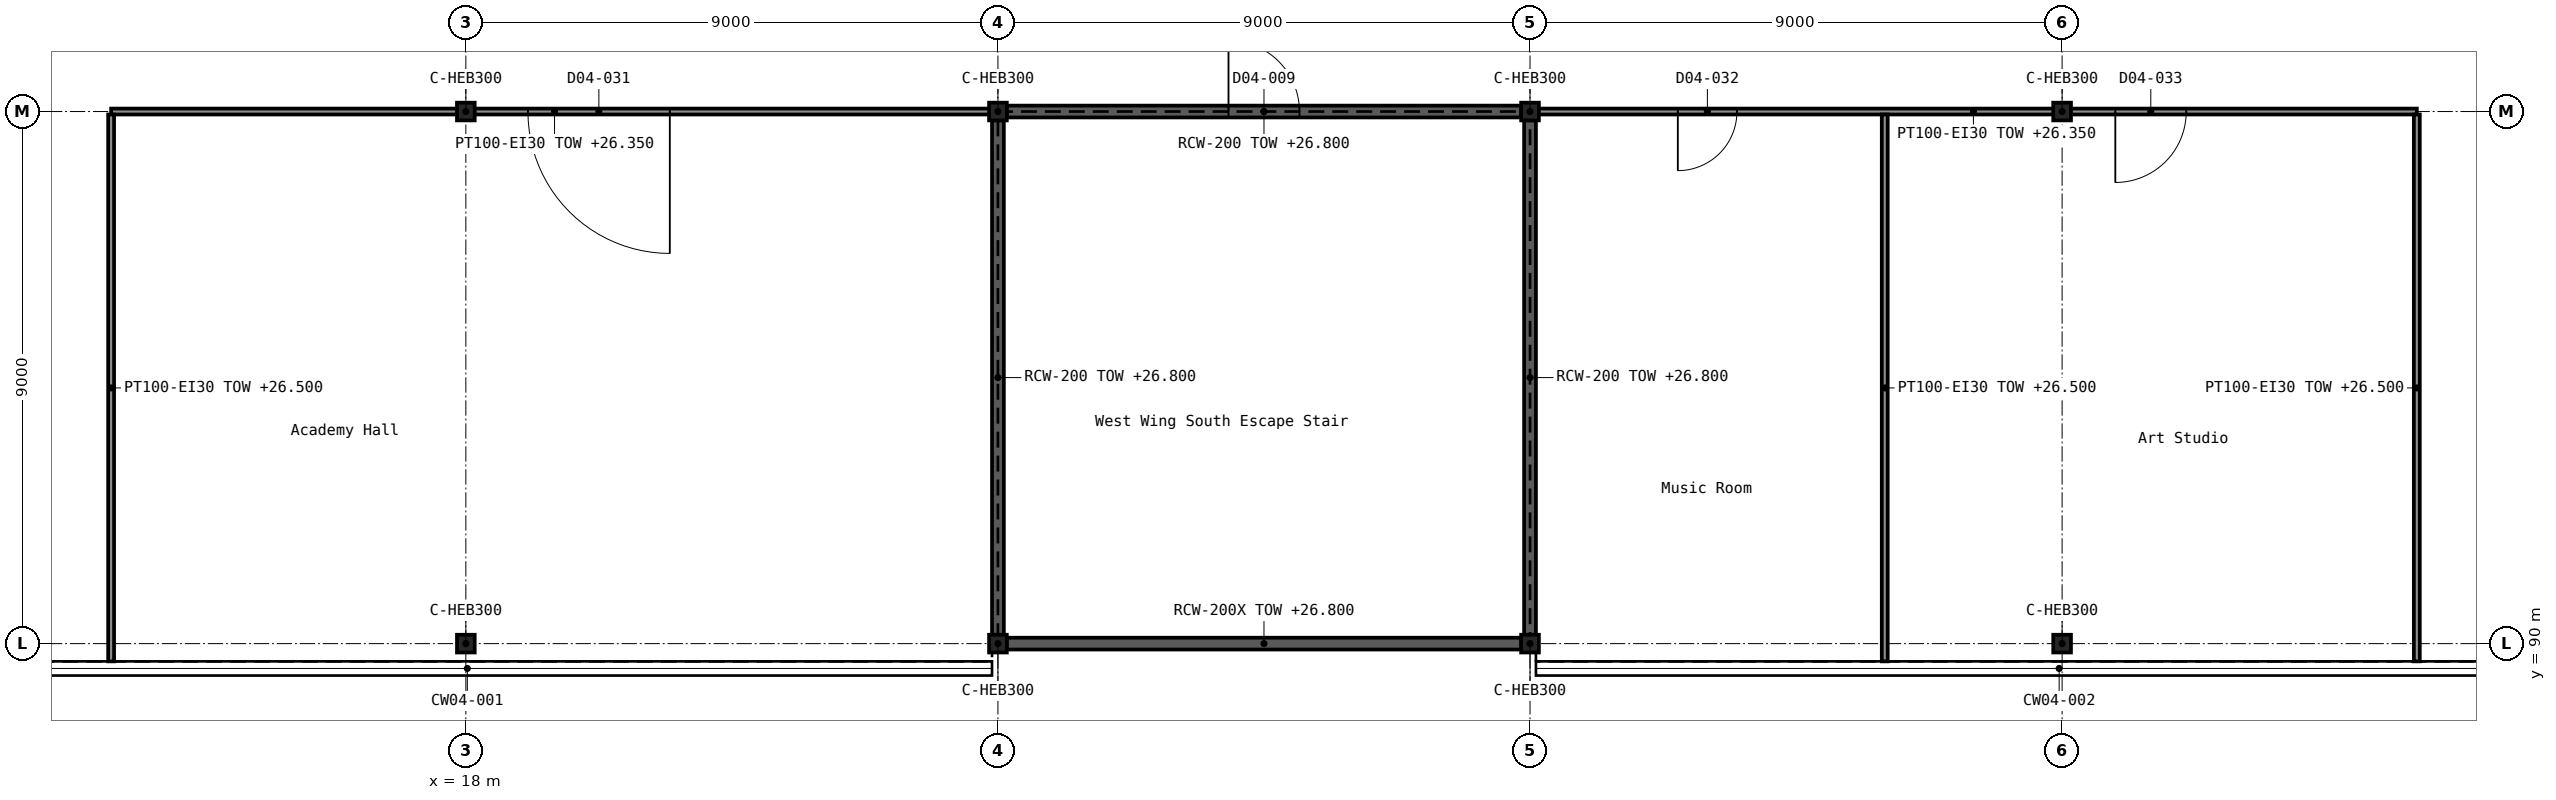
"""IFC4 building model, lengths in metres.
Left out: names, types, materials, properties, quantities, classifications, styles, units other than length and angle.
Written with IfcOpenShell. Run it as: python <this file> out.ifc"""

import sys

from ifc_helpers import new_model, si_unit, direction, frame, frame_2d, origin, origin_2d, place, context, subcontext, project, spatial, rectangle, i_section, extrude, element, fill, save


model = new_model("IFC4")
c1 = context("Model", 3, precision=1e-05, world=origin(), true_north=direction((0.0, 1.0)))
c2 = subcontext(c1, "Body", "Model", "MODEL_VIEW")
j1 = project(units=[si_unit("LENGTHUNIT", "METRE"), si_unit("PLANEANGLEUNIT", "RADIAN")], contexts=[c1])
p1 = place(None, origin())
s1 = spatial("IfcSite", under=j1, at=p1, CompositionType="ELEMENT")
p2 = place(p1, origin())
s2 = spatial("IfcBuilding", under=s1, at=p2, CompositionType="ELEMENT")
p3 = place(p2, frame((0.0, 0.0, 21.6)))
s3 = spatial("IfcBuildingStorey", under=s2, at=p3, CompositionType="ELEMENT", Elevation=21.6)
for number, where, z_axis, x_axis in (
    (1, (18.0, 90.0, 0.0), (0.0, 0.0, 1.0), (1.0, 0.0, 0.0)),
    (2, (27.0, 90.0, 0.0), (0.0, 0.0, 1.0), (1.0, 0.0, 0.0)),
    (3, (36.0, 90.0, 0.0), (0.0, 0.0, 1.0), (1.0, 0.0, 0.0)),
    (4, (45.0, 90.0, 0.0), (0.0, 0.0, 1.0), (1.0, 0.0, 0.0)),
    (5, (18.0, 99.0, 0.0), (0.0, 0.0, 1.0), (1.0, 0.0, 0.0)),
    (6, (27.0, 99.0, 0.0), (0.0, 0.0, 1.0), (1.0, 0.0, 0.0)),
    (7, (36.0, 99.0, 0.0), (0.0, 0.0, 1.0), (1.0, 0.0, 0.0)),
    (8, (45.0, 99.0, 0.0), (0.0, 0.0, 1.0), (1.0, 0.0, 0.0)),
):
    element("IfcColumn", number, at=place(p3, frame(where, z_axis=z_axis, x_axis=x_axis)), inside=s3, PredefinedType="COLUMN", context=c2, shape_type="SweptSolid", body=[
        extrude(i_section(OverallWidth=0.3, OverallDepth=0.3, WebThickness=0.011, FlangeThickness=0.019, FilletRadius=0.027, at=origin_2d()), origin(), (0.0, 0.0, 1.0), 5.4),
    ])
p4 = place(p3, frame((27.15, 90.0, 0.0), z_axis=(0.0, 0.0, 1.0), x_axis=(1.0, 0.0, 0.0)))
e9 = element("IfcWall", 9, at=p4, inside=s3, PredefinedType="SHEAR", context=c2, shape_type="SweptSolid", body=[
    extrude(rectangle(XDim=8.7, YDim=0.2, at=frame_2d((4.35, 0.0))), origin(), (0.0, 0.0, 1.0), 5.2),
])
p5 = place(p3, frame((27.15, 99.0, 0.0), z_axis=(0.0, 0.0, 1.0), x_axis=(1.0, 0.0, 0.0)))
e10 = element("IfcWall", 10, at=p5, inside=s3, PredefinedType="SHEAR", context=c2, shape_type="SweptSolid", body=[
    extrude(rectangle(XDim=8.7, YDim=0.2, at=frame_2d((4.35, 0.0))), origin(), (0.0, 0.0, 1.0), 5.2),
])
p6 = place(p5, frame((3.75, 0.0, 0.0)))
e11 = element("IfcOpeningElement", 11, at=p6, cuts=e10, PredefinedType="OPENING", context=c2, shape_type="SweptSolid", body=[
    extrude(rectangle(XDim=1.2, YDim=2.1, at=frame_2d((0.6, 1.05))), frame((0.0, 0.111, 0.0), z_axis=(0.0, -1.0, 0.0), x_axis=(1.0, 0.0, 0.0)), (0.0, 0.0, 1.0), 0.222),
])
for number, where, z_axis, x_axis in (
    (12, (27.0, 90.15, 0.0), (0.0, 0.0, 1.0), (0.0, 1.0, 0.0)),
    (13, (36.0, 90.15, 0.0), (0.0, 0.0, 1.0), (0.0, 1.0, 0.0)),
):
    element("IfcWall", number, at=place(p3, frame(where, z_axis=z_axis, x_axis=x_axis)), inside=s3, PredefinedType="SHEAR", context=c2, shape_type="SweptSolid", body=[
        extrude(rectangle(XDim=8.7, YDim=0.2, at=frame_2d((4.35, 0.0))), origin(), (0.0, 0.0, 1.0), 5.2),
    ])
p7 = place(p3, frame((12.0, 99.0, 0.0), z_axis=(0.0, 0.0, 1.0), x_axis=(1.0, 0.0, 0.0)))
e14 = element("IfcWall", 14, at=p7, inside=s3, PredefinedType="PARTITIONING", context=c2, shape_type="SweptSolid", body=[
    extrude(rectangle(XDim=15.0, YDim=0.1, at=frame_2d((7.5, 0.0))), origin(), (0.0, 0.0, 1.0), 4.75),
])
p8 = place(p7, frame((7.05, 0.0, 0.0)))
e15 = element("IfcOpeningElement", 15, at=p8, cuts=e14, PredefinedType="OPENING", context=c2, shape_type="SweptSolid", body=[
    extrude(rectangle(XDim=2.4, YDim=2.1, at=frame_2d((1.2, 1.05))), frame((0.0, 0.061, 0.0), z_axis=(0.0, -1.0, 0.0), x_axis=(1.0, 0.0, 0.0)), (0.0, 0.0, 1.0), 0.122),
])
p9 = place(p3, frame((36.0, 99.0, 0.0), z_axis=(0.0, 0.0, 1.0), x_axis=(1.0, 0.0, 0.0)))
e16 = element("IfcWall", 16, at=p9, inside=s3, PredefinedType="PARTITIONING", context=c2, shape_type="SweptSolid", body=[
    extrude(rectangle(XDim=15.0, YDim=0.1, at=frame_2d((7.5, 0.0))), origin(), (0.0, 0.0, 1.0), 4.75),
])
p10 = place(p9, frame((2.5, 0.0, 0.0)))
e17 = element("IfcOpeningElement", 17, at=p10, cuts=e16, PredefinedType="OPENING", context=c2, shape_type="SweptSolid", body=[
    extrude(rectangle(XDim=1.0, YDim=2.1, at=frame_2d((0.5, 1.05))), frame((0.0, 0.061, 0.0), z_axis=(0.0, -1.0, 0.0), x_axis=(1.0, 0.0, 0.0)), (0.0, 0.0, 1.0), 0.122),
])
p11 = place(p9, frame((9.9, 0.0, 0.0)))
e18 = element("IfcOpeningElement", 18, at=p11, cuts=e16, PredefinedType="OPENING", context=c2, shape_type="SweptSolid", body=[
    extrude(rectangle(XDim=1.2, YDim=2.1, at=frame_2d((0.6, 1.05))), frame((0.0, 0.061, 0.0), z_axis=(0.0, -1.0, 0.0), x_axis=(1.0, 0.0, 0.0)), (0.0, 0.0, 1.0), 0.122),
])
for number, where, z_axis, x_axis in (
    (19, (12.0, 89.7, 0.0), (0.0, 0.0, 1.0), (0.0, 1.0, 0.0)),
    (20, (42.0, 89.7, 0.0), (0.0, 0.0, 1.0), (0.0, 1.0, 0.0)),
    (21, (51.0, 89.7, 0.0), (0.0, 0.0, 1.0), (0.0, 1.0, 0.0)),
):
    element("IfcWall", number, at=place(p3, frame(where, z_axis=z_axis, x_axis=x_axis)), inside=s3, PredefinedType="PARTITIONING", context=c2, shape_type="SweptSolid", body=[
        extrude(rectangle(XDim=9.25, YDim=0.1, at=frame_2d((4.625, 0.0))), origin(), (0.0, 0.0, 1.0), 4.9),
    ])
p12 = place(p6, origin())
e22 = element("IfcDoor", 22, at=p12, inside=s3, OperationType="SINGLE_SWING_LEFT", PredefinedType="DOOR", context=c2, shape_type="SweptSolid", body=[
    extrude(rectangle(XDim=1.2, YDim=2.1, at=frame_2d((0.6, 1.05))), frame((0.0, 0.025, 0.0), z_axis=(0.0, -1.0, 0.0), x_axis=(1.0, 0.0, 0.0)), (0.0, 0.0, 1.0), 0.05),
])
fill(e11, e22)
p13 = place(p8, frame((2.4, 0.0, 0.0), z_axis=(0.0, 0.0, 1.0), x_axis=(-1.0, 0.0, 0.0)))
e23 = element("IfcDoor", 23, at=p13, inside=s3, OperationType="DOUBLE_DOOR_SINGLE_SWING", PredefinedType="DOOR", context=c2, shape_type="SweptSolid", body=[
    extrude(rectangle(XDim=2.4, YDim=2.1, at=frame_2d((1.2, 1.05))), frame((0.0, 0.025, 0.0), z_axis=(0.0, -1.0, 0.0), x_axis=(1.0, 0.0, 0.0)), (0.0, 0.0, 1.0), 0.05),
])
fill(e15, e23)
p14 = place(p10, frame((1.0, 0.0, 0.0), z_axis=(0.0, 0.0, 1.0), x_axis=(-1.0, 0.0, 0.0)))
e24 = element("IfcDoor", 24, at=p14, inside=s3, OperationType="SINGLE_SWING_RIGHT", PredefinedType="DOOR", context=c2, shape_type="SweptSolid", body=[
    extrude(rectangle(XDim=1.0, YDim=2.1, at=frame_2d((0.5, 1.05))), frame((0.0, 0.025, 0.0), z_axis=(0.0, -1.0, 0.0), x_axis=(1.0, 0.0, 0.0)), (0.0, 0.0, 1.0), 0.05),
])
fill(e17, e24)
p15 = place(p11, frame((1.2, 0.0, 0.0), z_axis=(0.0, 0.0, 1.0), x_axis=(-1.0, 0.0, 0.0)))
e25 = element("IfcDoor", 25, at=p15, inside=s3, OperationType="SINGLE_SWING_RIGHT", PredefinedType="DOOR", context=c2, shape_type="SweptSolid", body=[
    extrude(rectangle(XDim=1.2, YDim=2.1, at=frame_2d((0.6, 1.05))), frame((0.0, 0.025, 0.0), z_axis=(0.0, -1.0, 0.0), x_axis=(1.0, 0.0, 0.0)), (0.0, 0.0, 1.0), 0.05),
])
fill(e18, e25)
save(model, sys.argv[1])
